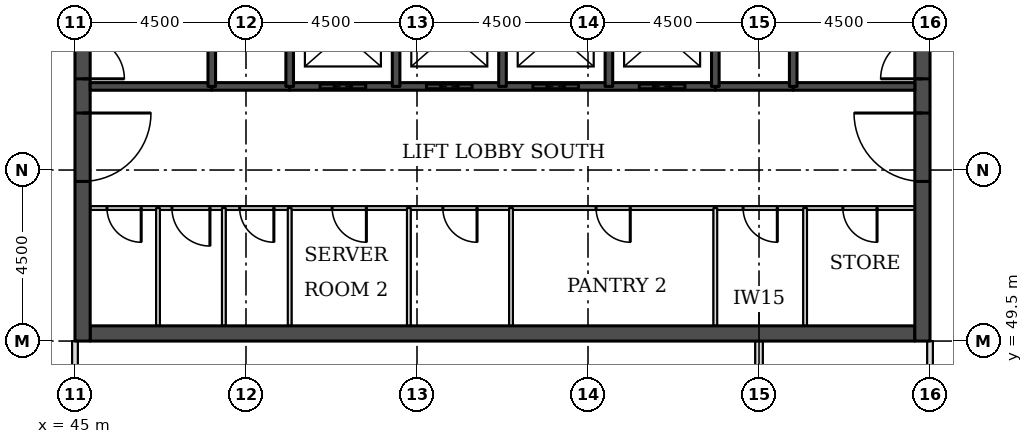
"""IFC4 building model, lengths in metres.
Left out: names, types, materials, properties, quantities, classifications, styles, units other than length and angle.
Written with IfcOpenShell. Run it as: python <this file> out.ifc"""

import sys

from ifc_helpers import new_model, si_unit, direction, frame, frame_2d, origin, place, context, subcontext, project, spatial, rectangle, extrude, element, fill, save


model = new_model("IFC4")
c1 = context("Model", 3, precision=1e-05, world=origin(), true_north=direction((0.0, 1.0)))
c2 = subcontext(c1, "Body", "Model", "MODEL_VIEW")
j1 = project(units=[si_unit("LENGTHUNIT", "METRE"), si_unit("PLANEANGLEUNIT", "RADIAN")], contexts=[c1])
p1 = place(None, origin())
s1 = spatial("IfcSite", under=j1, at=p1, CompositionType="ELEMENT")
p2 = place(p1, origin())
s2 = spatial("IfcBuilding", under=s1, at=p2, CompositionType="ELEMENT")
p3 = place(p2, frame((0.0, 0.0, 188.4)))
s3 = spatial("IfcBuildingStorey", under=s2, at=p3, CompositionType="ELEMENT", Elevation=188.4)
p4 = place(p3, frame((45.4, 49.7, 0.0), z_axis=(0.0, 0.0, 1.0), x_axis=(1.0, 0.0, 0.0)))
e1 = element("IfcWall", 1, at=p4, inside=s3, PredefinedType="SHEAR", context=c2, shape_type="SweptSolid", body=[
    extrude(rectangle(XDim=21.7, YDim=0.4, at=frame_2d((10.85, 0.0))), origin(), (0.0, 0.0, 1.0), 3.7),
])
p5 = place(p3, frame((45.2, 49.5, 0.0), z_axis=(0.0, 0.0, 1.0), x_axis=(0.0, 1.0, 0.0)))
e2 = element("IfcWall", 2, at=p5, inside=s3, PredefinedType="SHEAR", context=c2, shape_type="SweptSolid", body=[
    extrude(rectangle(XDim=22.5, YDim=0.4, at=frame_2d((11.25, 0.0))), origin(), (0.0, 0.0, 1.0), 3.7),
])
p6 = place(p5, frame((4.2, 0.0, 0.0)))
e3 = element("IfcOpeningElement", 3, at=p6, cuts=e2, PredefinedType="OPENING", context=c2, shape_type="SweptSolid", body=[
    extrude(rectangle(XDim=1.8, YDim=2.1, at=frame_2d((0.9, 1.05))), frame((0.0, 0.21, 0.0), z_axis=(0.0, -1.0, 0.0), x_axis=(1.0, 0.0, 0.0)), (0.0, 0.0, 1.0), 0.42),
])
p7 = place(p5, frame((6.9, 0.0, 0.0)))
e4 = element("IfcOpeningElement", 4, at=p7, cuts=e2, PredefinedType="OPENING", context=c2, shape_type="SweptSolid", body=[
    extrude(rectangle(XDim=1.1, YDim=2.1, at=frame_2d((0.55, 1.05))), frame((0.0, 0.21, 0.0), z_axis=(0.0, -1.0, 0.0), x_axis=(1.0, 0.0, 0.0)), (0.0, 0.0, 1.0), 0.42),
])
p8 = place(p5, frame((13.6, 0.0, 0.0)))
e5 = element("IfcOpeningElement", 5, at=p8, cuts=e2, PredefinedType="OPENING", context=c2, shape_type="SweptSolid", body=[
    extrude(rectangle(XDim=1.1, YDim=2.1, at=frame_2d((0.55, 1.05))), frame((0.0, 0.21, 0.0), z_axis=(0.0, -1.0, 0.0), x_axis=(1.0, 0.0, 0.0)), (0.0, 0.0, 1.0), 0.42),
])
p9 = place(p5, frame((16.5, 0.0, 0.0)))
e6 = element("IfcOpeningElement", 6, at=p9, cuts=e2, PredefinedType="OPENING", context=c2, shape_type="SweptSolid", body=[
    extrude(rectangle(XDim=1.8, YDim=2.1, at=frame_2d((0.9, 1.05))), frame((0.0, 0.21, 0.0), z_axis=(0.0, -1.0, 0.0), x_axis=(1.0, 0.0, 0.0)), (0.0, 0.0, 1.0), 0.42),
])
p10 = place(p3, frame((67.3, 49.5, 0.0), z_axis=(0.0, 0.0, 1.0), x_axis=(0.0, 1.0, 0.0)))
e7 = element("IfcWall", 7, at=p10, inside=s3, PredefinedType="SHEAR", context=c2, shape_type="SweptSolid", body=[
    extrude(rectangle(XDim=22.5, YDim=0.4, at=frame_2d((11.25, 0.0))), origin(), (0.0, 0.0, 1.0), 3.7),
])
p11 = place(p10, frame((4.2, 0.0, 0.0)))
e8 = element("IfcOpeningElement", 8, at=p11, cuts=e7, PredefinedType="OPENING", context=c2, shape_type="SweptSolid", body=[
    extrude(rectangle(XDim=1.8, YDim=2.1, at=frame_2d((0.9, 1.05))), frame((0.0, 0.21, 0.0), z_axis=(0.0, -1.0, 0.0), x_axis=(1.0, 0.0, 0.0)), (0.0, 0.0, 1.0), 0.42),
])
p12 = place(p10, frame((6.9, 0.0, 0.0)))
e9 = element("IfcOpeningElement", 9, at=p12, cuts=e7, PredefinedType="OPENING", context=c2, shape_type="SweptSolid", body=[
    extrude(rectangle(XDim=1.1, YDim=2.1, at=frame_2d((0.55, 1.05))), frame((0.0, 0.21, 0.0), z_axis=(0.0, -1.0, 0.0), x_axis=(1.0, 0.0, 0.0)), (0.0, 0.0, 1.0), 0.42),
])
p13 = place(p10, frame((13.6, 0.0, 0.0)))
e10 = element("IfcOpeningElement", 10, at=p13, cuts=e7, PredefinedType="OPENING", context=c2, shape_type="SweptSolid", body=[
    extrude(rectangle(XDim=1.1, YDim=2.1, at=frame_2d((0.55, 1.05))), frame((0.0, 0.21, 0.0), z_axis=(0.0, -1.0, 0.0), x_axis=(1.0, 0.0, 0.0)), (0.0, 0.0, 1.0), 0.42),
])
p14 = place(p10, frame((16.5, 0.0, 0.0)))
e11 = element("IfcOpeningElement", 11, at=p14, cuts=e7, PredefinedType="OPENING", context=c2, shape_type="SweptSolid", body=[
    extrude(rectangle(XDim=1.8, YDim=2.1, at=frame_2d((0.9, 1.05))), frame((0.0, 0.21, 0.0), z_axis=(0.0, -1.0, 0.0), x_axis=(1.0, 0.0, 0.0)), (0.0, 0.0, 1.0), 0.42),
])
p15 = place(p3, frame((67.5, 45.0, 0.0), z_axis=(0.0, 0.0, 1.0), x_axis=(0.0, 1.0, 0.0)))
e12 = element("IfcWall", 12, at=p15, inside=s3, PredefinedType="PARTITIONING", context=c2, shape_type="SweptSolid", body=[
    extrude(rectangle(XDim=4.5, YDim=0.15, at=frame_2d((2.25, 0.0))), origin(), (0.0, 0.0, 1.0), 3.022),
])
p16 = place(p3, frame((63.0, 46.5, 0.0), z_axis=(0.0, 0.0, 1.0), x_axis=(0.0, 1.0, 0.0)))
e13 = element("IfcWall", 13, at=p16, inside=s3, PredefinedType="PARTITIONING", context=c2, shape_type="SweptSolid", body=[
    extrude(rectangle(XDim=3.0, YDim=0.2, at=frame_2d((1.5, 0.0))), origin(), (0.0, 0.0, 1.0), 3.55),
])
p17 = place(p3, frame((45.0, 48.0, 0.0), z_axis=(0.0, 0.0, 1.0), x_axis=(0.0, 1.0, 0.0)))
e14 = element("IfcWall", 14, at=p17, inside=s3, PredefinedType="PARTITIONING", context=c2, shape_type="SweptSolid", body=[
    extrude(rectangle(XDim=1.5, YDim=0.15, at=frame_2d((0.75, 0.0))), origin(), (0.0, 0.0, 1.0), 3.022),
])
p18 = place(p3, frame((45.4, 53.0, 0.0), z_axis=(0.0, 0.0, 1.0), x_axis=(1.0, 0.0, 0.0)))
e15 = element("IfcWall", 15, at=p18, inside=s3, PredefinedType="PARTITIONING", context=c2, shape_type="SweptSolid", body=[
    extrude(rectangle(XDim=21.7, YDim=0.1, at=frame_2d((10.85, 0.0))), origin(), (0.0, 0.0, 1.0), 3.55),
])
p19 = place(p18, frame((19.806, 0.0, 0.0)))
e16 = element("IfcOpeningElement", 16, at=p19, cuts=e15, PredefinedType="OPENING", context=c2, shape_type="SweptSolid", body=[
    extrude(rectangle(XDim=0.9, YDim=2.1, at=frame_2d((0.45, 1.05))), frame((0.0, 0.06, 0.0), z_axis=(0.0, -1.0, 0.0), x_axis=(1.0, 0.0, 0.0)), (0.0, 0.0, 1.0), 0.12),
])
p20 = place(p18, frame((17.181, 0.0, 0.0)))
e17 = element("IfcOpeningElement", 17, at=p20, cuts=e15, PredefinedType="OPENING", context=c2, shape_type="SweptSolid", body=[
    extrude(rectangle(XDim=0.9, YDim=2.1, at=frame_2d((0.45, 1.05))), frame((0.0, 0.06, 0.0), z_axis=(0.0, -1.0, 0.0), x_axis=(1.0, 0.0, 0.0)), (0.0, 0.0, 1.0), 0.12),
])
p21 = place(p18, frame((0.442, 0.0, 0.0)))
e18 = element("IfcOpeningElement", 18, at=p21, cuts=e15, PredefinedType="OPENING", context=c2, shape_type="SweptSolid", body=[
    extrude(rectangle(XDim=0.9, YDim=2.1, at=frame_2d((0.45, 1.05))), frame((0.0, 0.06, 0.0), z_axis=(0.0, -1.0, 0.0), x_axis=(1.0, 0.0, 0.0)), (0.0, 0.0, 1.0), 0.12),
])
p22 = place(p18, frame((2.151, 0.0, 0.0)))
e19 = element("IfcOpeningElement", 19, at=p22, cuts=e15, PredefinedType="OPENING", context=c2, shape_type="SweptSolid", body=[
    extrude(rectangle(XDim=1.0, YDim=2.1, at=frame_2d((0.5, 1.05))), frame((0.0, 0.06, 0.0), z_axis=(0.0, -1.0, 0.0), x_axis=(1.0, 0.0, 0.0)), (0.0, 0.0, 1.0), 0.12),
])
p23 = place(p18, frame((3.934, 0.0, 0.0)))
e20 = element("IfcOpeningElement", 20, at=p23, cuts=e15, PredefinedType="OPENING", context=c2, shape_type="SweptSolid", body=[
    extrude(rectangle(XDim=0.9, YDim=2.1, at=frame_2d((0.45, 1.05))), frame((0.0, 0.06, 0.0), z_axis=(0.0, -1.0, 0.0), x_axis=(1.0, 0.0, 0.0)), (0.0, 0.0, 1.0), 0.12),
])
p24 = place(p18, frame((6.368, 0.0, 0.0)))
e21 = element("IfcOpeningElement", 21, at=p24, cuts=e15, PredefinedType="OPENING", context=c2, shape_type="SweptSolid", body=[
    extrude(rectangle(XDim=0.9, YDim=2.1, at=frame_2d((0.45, 1.05))), frame((0.0, 0.06, 0.0), z_axis=(0.0, -1.0, 0.0), x_axis=(1.0, 0.0, 0.0)), (0.0, 0.0, 1.0), 0.12),
])
p25 = place(p18, frame((9.28, 0.0, 0.0)))
e22 = element("IfcOpeningElement", 22, at=p25, cuts=e15, PredefinedType="OPENING", context=c2, shape_type="SweptSolid", body=[
    extrude(rectangle(XDim=0.9, YDim=2.1, at=frame_2d((0.45, 1.05))), frame((0.0, 0.06, 0.0), z_axis=(0.0, -1.0, 0.0), x_axis=(1.0, 0.0, 0.0)), (0.0, 0.0, 1.0), 0.12),
])
p26 = place(p18, frame((13.312, 0.0, 0.0)))
e23 = element("IfcOpeningElement", 23, at=p26, cuts=e15, PredefinedType="OPENING", context=c2, shape_type="SweptSolid", body=[
    extrude(rectangle(XDim=0.9, YDim=2.1, at=frame_2d((0.45, 1.05))), frame((0.0, 0.06, 0.0), z_axis=(0.0, -1.0, 0.0), x_axis=(1.0, 0.0, 0.0)), (0.0, 0.0, 1.0), 0.12),
])
for number, where, z_axis, x_axis in (
    (24, (48.6, 56.2, 0.0), (0.0, 0.0, 1.0), (1.0, 0.0, 0.0)),
    (25, (61.85, 56.2, 0.0), (0.0, 0.0, 1.0), (1.0, 0.0, 0.0)),
):
    element("IfcWall", number, at=place(p3, frame(where, z_axis=z_axis, x_axis=x_axis)), inside=s3, PredefinedType="SOLIDWALL", context=c2, shape_type="SweptSolid", body=[
        extrude(rectangle(XDim=2.05, YDim=0.2, at=frame_2d((1.025, 0.0))), origin(), (0.0, 0.0, 1.0), 3.55),
    ])
p27 = place(p3, frame((45.4, 56.2, 0.0), z_axis=(0.0, 0.0, 1.0), x_axis=(1.0, 0.0, 0.0)))
e26 = element("IfcWall", 26, at=p27, inside=s3, PredefinedType="SOLIDWALL", context=c2, shape_type="SweptSolid", body=[
    extrude(rectangle(XDim=3.2, YDim=0.2, at=frame_2d((1.6, 0.0))), origin(), (0.0, 0.0, 1.0), 3.55),
])
p28 = place(p3, frame((50.65, 56.2, 0.0), z_axis=(0.0, 0.0, 1.0), x_axis=(1.0, 0.0, 0.0)))
e27 = element("IfcWall", 27, at=p28, inside=s3, PredefinedType="SOLIDWALL", context=c2, shape_type="SweptSolid", body=[
    extrude(rectangle(XDim=11.2, YDim=0.2, at=frame_2d((5.6, 0.0))), origin(), (0.0, 0.0, 1.0), 3.55),
])
p29 = place(p28, frame((0.8, 0.0, 0.0)))
e28 = element("IfcOpeningElement", 28, at=p29, cuts=e27, PredefinedType="OPENING", context=c2, shape_type="SweptSolid", body=[
    extrude(rectangle(XDim=1.2, YDim=2.1, at=frame_2d((0.6, 1.05))), frame((0.0, 0.11, 0.0), z_axis=(0.0, -1.0, 0.0), x_axis=(1.0, 0.0, 0.0)), (0.0, 0.0, 1.0), 0.22),
])
p30 = place(p28, frame((3.6, 0.0, 0.0)))
e29 = element("IfcOpeningElement", 29, at=p30, cuts=e27, PredefinedType="OPENING", context=c2, shape_type="SweptSolid", body=[
    extrude(rectangle(XDim=1.2, YDim=2.1, at=frame_2d((0.6, 1.05))), frame((0.0, 0.11, 0.0), z_axis=(0.0, -1.0, 0.0), x_axis=(1.0, 0.0, 0.0)), (0.0, 0.0, 1.0), 0.22),
])
p31 = place(p28, frame((6.4, 0.0, 0.0)))
e30 = element("IfcOpeningElement", 30, at=p31, cuts=e27, PredefinedType="OPENING", context=c2, shape_type="SweptSolid", body=[
    extrude(rectangle(XDim=1.2, YDim=2.1, at=frame_2d((0.6, 1.05))), frame((0.0, 0.11, 0.0), z_axis=(0.0, -1.0, 0.0), x_axis=(1.0, 0.0, 0.0)), (0.0, 0.0, 1.0), 0.22),
])
p32 = place(p28, frame((9.2, 0.0, 0.0)))
e31 = element("IfcOpeningElement", 31, at=p32, cuts=e27, PredefinedType="OPENING", context=c2, shape_type="SweptSolid", body=[
    extrude(rectangle(XDim=1.2, YDim=2.1, at=frame_2d((0.6, 1.05))), frame((0.0, 0.11, 0.0), z_axis=(0.0, -1.0, 0.0), x_axis=(1.0, 0.0, 0.0)), (0.0, 0.0, 1.0), 0.22),
])
p33 = place(p3, frame((63.9, 56.2, 0.0), z_axis=(0.0, 0.0, 1.0), x_axis=(1.0, 0.0, 0.0)))
e32 = element("IfcWall", 32, at=p33, inside=s3, PredefinedType="SOLIDWALL", context=c2, shape_type="SweptSolid", body=[
    extrude(rectangle(XDim=3.2, YDim=0.2, at=frame_2d((1.6, 0.0))), origin(), (0.0, 0.0, 1.0), 3.55),
])
p34 = place(p3, frame((47.185, 49.9, 0.0), z_axis=(0.0, 0.0, 1.0), x_axis=(0.0, 1.0, 0.0)))
e33 = element("IfcWall", 33, at=p34, inside=s3, PredefinedType="PARTITIONING", context=c2, shape_type="SweptSolid", body=[
    extrude(rectangle(XDim=3.1, YDim=0.1, at=frame_2d((1.55, 0.0))), origin(), (0.0, 0.0, 1.0), 3.55),
])
p35 = place(p3, frame((48.6, 56.2, 0.0), z_axis=(0.0, 0.0, 1.0), x_axis=(0.0, 1.0, 0.0)))
e34 = element("IfcWall", 34, at=p35, inside=s3, PredefinedType="SOLIDWALL", context=c2, shape_type="SweptSolid", body=[
    extrude(rectangle(XDim=5.8, YDim=0.2, at=frame_2d((2.9, 0.0))), origin(), (0.0, 0.0, 1.0), 3.55),
])
for number, where, z_axis, x_axis in (
    (35, (48.917, 49.9, 0.0), (0.0, 0.0, 1.0), (0.0, 1.0, 0.0)),
    (36, (50.65, 49.9, 0.0), (0.0, 0.0, 1.0), (0.0, 1.0, 0.0)),
):
    element("IfcWall", number, at=place(p3, frame(where, z_axis=z_axis, x_axis=x_axis)), inside=s3, PredefinedType="PARTITIONING", context=c2, shape_type="SweptSolid", body=[
        extrude(rectangle(XDim=3.1, YDim=0.1, at=frame_2d((1.55, 0.0))), origin(), (0.0, 0.0, 1.0), 3.55),
    ])
for number, where, z_axis, x_axis in (
    (37, (50.65, 56.2, 0.0), (0.0, 0.0, 1.0), (0.0, 1.0, 0.0)),
    (38, (53.45, 56.2, 0.0), (0.0, 0.0, 1.0), (0.0, 1.0, 0.0)),
):
    element("IfcWall", number, at=place(p3, frame(where, z_axis=z_axis, x_axis=x_axis)), inside=s3, PredefinedType="SOLIDWALL", context=c2, shape_type="SweptSolid", body=[
        extrude(rectangle(XDim=2.8, YDim=0.2, at=frame_2d((1.4, 0.0))), origin(), (0.0, 0.0, 1.0), 3.55),
    ])
p36 = place(p3, frame((53.786, 49.9, 0.0), z_axis=(0.0, 0.0, 1.0), x_axis=(0.0, 1.0, 0.0)))
e39 = element("IfcWall", 39, at=p36, inside=s3, PredefinedType="PARTITIONING", context=c2, shape_type="SweptSolid", body=[
    extrude(rectangle(XDim=3.1, YDim=0.1, at=frame_2d((1.55, 0.0))), origin(), (0.0, 0.0, 1.0), 3.55),
])
p37 = place(p3, frame((56.25, 56.2, 0.0), z_axis=(0.0, 0.0, 1.0), x_axis=(0.0, 1.0, 0.0)))
e40 = element("IfcWall", 40, at=p37, inside=s3, PredefinedType="SOLIDWALL", context=c2, shape_type="SweptSolid", body=[
    extrude(rectangle(XDim=2.8, YDim=0.2, at=frame_2d((1.4, 0.0))), origin(), (0.0, 0.0, 1.0), 3.55),
])
p38 = place(p3, frame((56.474, 49.9, 0.0), z_axis=(0.0, 0.0, 1.0), x_axis=(0.0, 1.0, 0.0)))
e41 = element("IfcWall", 41, at=p38, inside=s3, PredefinedType="PARTITIONING", context=c2, shape_type="SweptSolid", body=[
    extrude(rectangle(XDim=3.1, YDim=0.1, at=frame_2d((1.55, 0.0))), origin(), (0.0, 0.0, 1.0), 3.55),
])
p39 = place(p3, frame((59.05, 56.2, 0.0), z_axis=(0.0, 0.0, 1.0), x_axis=(0.0, 1.0, 0.0)))
e42 = element("IfcWall", 42, at=p39, inside=s3, PredefinedType="SOLIDWALL", context=c2, shape_type="SweptSolid", body=[
    extrude(rectangle(XDim=2.8, YDim=0.2, at=frame_2d((1.4, 0.0))), origin(), (0.0, 0.0, 1.0), 3.55),
])
p40 = place(p3, frame((61.85, 49.9, 0.0), z_axis=(0.0, 0.0, 1.0), x_axis=(0.0, 1.0, 0.0)))
e43 = element("IfcWall", 43, at=p40, inside=s3, PredefinedType="PARTITIONING", context=c2, shape_type="SweptSolid", body=[
    extrude(rectangle(XDim=3.1, YDim=0.1, at=frame_2d((1.55, 0.0))), origin(), (0.0, 0.0, 1.0), 3.55),
])
p41 = place(p3, frame((61.85, 56.2, 0.0), z_axis=(0.0, 0.0, 1.0), x_axis=(0.0, 1.0, 0.0)))
e44 = element("IfcWall", 44, at=p41, inside=s3, PredefinedType="SOLIDWALL", context=c2, shape_type="SweptSolid", body=[
    extrude(rectangle(XDim=2.8, YDim=0.2, at=frame_2d((1.4, 0.0))), origin(), (0.0, 0.0, 1.0), 3.55),
])
p42 = place(p3, frame((63.9, 56.2, 0.0), z_axis=(0.0, 0.0, 1.0), x_axis=(0.0, 1.0, 0.0)))
e45 = element("IfcWall", 45, at=p42, inside=s3, PredefinedType="SOLIDWALL", context=c2, shape_type="SweptSolid", body=[
    extrude(rectangle(XDim=5.8, YDim=0.2, at=frame_2d((2.9, 0.0))), origin(), (0.0, 0.0, 1.0), 3.55),
])
p43 = place(p3, frame((64.212, 49.9, 0.0), z_axis=(0.0, 0.0, 1.0), x_axis=(0.0, 1.0, 0.0)))
e46 = element("IfcWall", 46, at=p43, inside=s3, PredefinedType="PARTITIONING", context=c2, shape_type="SweptSolid", body=[
    extrude(rectangle(XDim=3.1, YDim=0.1, at=frame_2d((1.55, 0.0))), origin(), (0.0, 0.0, 1.0), 3.55),
])
p44 = place(p29, origin())
e47 = element("IfcDoor", 47, at=p44, inside=s3, OperationType="DOUBLE_DOOR_SLIDING", PredefinedType="DOOR", context=c2, shape_type="SweptSolid", body=[
    extrude(rectangle(XDim=1.2, YDim=2.1, at=frame_2d((0.6, 1.05))), frame((0.0, 0.025, 0.0), z_axis=(0.0, -1.0, 0.0), x_axis=(1.0, 0.0, 0.0)), (0.0, 0.0, 1.0), 0.05),
])
fill(e28, e47)
p45 = place(p30, origin())
e48 = element("IfcDoor", 48, at=p45, inside=s3, OperationType="DOUBLE_DOOR_SLIDING", PredefinedType="DOOR", context=c2, shape_type="SweptSolid", body=[
    extrude(rectangle(XDim=1.2, YDim=2.1, at=frame_2d((0.6, 1.05))), frame((0.0, 0.025, 0.0), z_axis=(0.0, -1.0, 0.0), x_axis=(1.0, 0.0, 0.0)), (0.0, 0.0, 1.0), 0.05),
])
fill(e29, e48)
p46 = place(p31, origin())
e49 = element("IfcDoor", 49, at=p46, inside=s3, OperationType="DOUBLE_DOOR_SLIDING", PredefinedType="DOOR", context=c2, shape_type="SweptSolid", body=[
    extrude(rectangle(XDim=1.2, YDim=2.1, at=frame_2d((0.6, 1.05))), frame((0.0, 0.025, 0.0), z_axis=(0.0, -1.0, 0.0), x_axis=(1.0, 0.0, 0.0)), (0.0, 0.0, 1.0), 0.05),
])
fill(e30, e49)
p47 = place(p32, origin())
e50 = element("IfcDoor", 50, at=p47, inside=s3, OperationType="DOUBLE_DOOR_SLIDING", PredefinedType="DOOR", context=c2, shape_type="SweptSolid", body=[
    extrude(rectangle(XDim=1.2, YDim=2.1, at=frame_2d((0.6, 1.05))), frame((0.0, 0.025, 0.0), z_axis=(0.0, -1.0, 0.0), x_axis=(1.0, 0.0, 0.0)), (0.0, 0.0, 1.0), 0.05),
])
fill(e31, e50)
p48 = place(p6, frame((1.8, 0.0, 0.0), z_axis=(0.0, 0.0, 1.0), x_axis=(-1.0, 0.0, 0.0)))
e51 = element("IfcDoor", 51, at=p48, inside=s3, OperationType="SINGLE_SWING_LEFT", PredefinedType="DOOR", context=c2, shape_type="SweptSolid", body=[
    extrude(rectangle(XDim=1.8, YDim=2.1, at=frame_2d((0.9, 1.05))), frame((0.0, 0.025, 0.0), z_axis=(0.0, -1.0, 0.0), x_axis=(1.0, 0.0, 0.0)), (0.0, 0.0, 1.0), 0.05),
])
fill(e3, e51)
p49 = place(p7, frame((1.1, 0.0, 0.0), z_axis=(0.0, 0.0, 1.0), x_axis=(-1.0, 0.0, 0.0)))
e52 = element("IfcDoor", 52, at=p49, inside=s3, OperationType="SINGLE_SWING_RIGHT", PredefinedType="DOOR", context=c2, shape_type="SweptSolid", body=[
    extrude(rectangle(XDim=1.1, YDim=2.1, at=frame_2d((0.55, 1.05))), frame((0.0, 0.025, 0.0), z_axis=(0.0, -1.0, 0.0), x_axis=(1.0, 0.0, 0.0)), (0.0, 0.0, 1.0), 0.05),
])
fill(e4, e52)
p50 = place(p11, origin())
e53 = element("IfcDoor", 53, at=p50, inside=s3, OperationType="SINGLE_SWING_RIGHT", PredefinedType="DOOR", context=c2, shape_type="SweptSolid", body=[
    extrude(rectangle(XDim=1.8, YDim=2.1, at=frame_2d((0.9, 1.05))), frame((0.0, 0.025, 0.0), z_axis=(0.0, -1.0, 0.0), x_axis=(1.0, 0.0, 0.0)), (0.0, 0.0, 1.0), 0.05),
])
fill(e8, e53)
p51 = place(p12, origin())
e54 = element("IfcDoor", 54, at=p51, inside=s3, OperationType="SINGLE_SWING_LEFT", PredefinedType="DOOR", context=c2, shape_type="SweptSolid", body=[
    extrude(rectangle(XDim=1.1, YDim=2.1, at=frame_2d((0.55, 1.05))), frame((0.0, 0.025, 0.0), z_axis=(0.0, -1.0, 0.0), x_axis=(1.0, 0.0, 0.0)), (0.0, 0.0, 1.0), 0.05),
])
fill(e9, e54)
p52 = place(p19, frame((0.9, 0.0, 0.0), z_axis=(0.0, 0.0, 1.0), x_axis=(-1.0, 0.0, 0.0)))
e55 = element("IfcDoor", 55, at=p52, inside=s3, OperationType="SINGLE_SWING_LEFT", PredefinedType="DOOR", context=c2, shape_type="SweptSolid", body=[
    extrude(rectangle(XDim=0.9, YDim=2.1, at=frame_2d((0.45, 1.05))), frame((0.0, 0.025, 0.0), z_axis=(0.0, -1.0, 0.0), x_axis=(1.0, 0.0, 0.0)), (0.0, 0.0, 1.0), 0.05),
])
fill(e16, e55)
p53 = place(p20, frame((0.9, 0.0, 0.0), z_axis=(0.0, 0.0, 1.0), x_axis=(-1.0, 0.0, 0.0)))
e56 = element("IfcDoor", 56, at=p53, inside=s3, OperationType="SINGLE_SWING_LEFT", PredefinedType="DOOR", context=c2, shape_type="SweptSolid", body=[
    extrude(rectangle(XDim=0.9, YDim=2.1, at=frame_2d((0.45, 1.05))), frame((0.0, 0.025, 0.0), z_axis=(0.0, -1.0, 0.0), x_axis=(1.0, 0.0, 0.0)), (0.0, 0.0, 1.0), 0.05),
])
fill(e17, e56)
p54 = place(p21, frame((0.9, 0.0, 0.0), z_axis=(0.0, 0.0, 1.0), x_axis=(-1.0, 0.0, 0.0)))
e57 = element("IfcDoor", 57, at=p54, inside=s3, OperationType="SINGLE_SWING_LEFT", PredefinedType="DOOR", context=c2, shape_type="SweptSolid", body=[
    extrude(rectangle(XDim=0.9, YDim=2.1, at=frame_2d((0.45, 1.05))), frame((0.0, 0.025, 0.0), z_axis=(0.0, -1.0, 0.0), x_axis=(1.0, 0.0, 0.0)), (0.0, 0.0, 1.0), 0.05),
])
fill(e18, e57)
p55 = place(p22, frame((1.0, 0.0, 0.0), z_axis=(0.0, 0.0, 1.0), x_axis=(-1.0, 0.0, 0.0)))
e58 = element("IfcDoor", 58, at=p55, inside=s3, OperationType="SINGLE_SWING_LEFT", PredefinedType="DOOR", context=c2, shape_type="SweptSolid", body=[
    extrude(rectangle(XDim=1.0, YDim=2.1, at=frame_2d((0.5, 1.05))), frame((0.0, 0.025, 0.0), z_axis=(0.0, -1.0, 0.0), x_axis=(1.0, 0.0, 0.0)), (0.0, 0.0, 1.0), 0.05),
])
fill(e19, e58)
p56 = place(p23, frame((0.9, 0.0, 0.0), z_axis=(0.0, 0.0, 1.0), x_axis=(-1.0, 0.0, 0.0)))
e59 = element("IfcDoor", 59, at=p56, inside=s3, OperationType="SINGLE_SWING_LEFT", PredefinedType="DOOR", context=c2, shape_type="SweptSolid", body=[
    extrude(rectangle(XDim=0.9, YDim=2.1, at=frame_2d((0.45, 1.05))), frame((0.0, 0.025, 0.0), z_axis=(0.0, -1.0, 0.0), x_axis=(1.0, 0.0, 0.0)), (0.0, 0.0, 1.0), 0.05),
])
fill(e20, e59)
p57 = place(p24, frame((0.9, 0.0, 0.0), z_axis=(0.0, 0.0, 1.0), x_axis=(-1.0, 0.0, 0.0)))
e60 = element("IfcDoor", 60, at=p57, inside=s3, OperationType="SINGLE_SWING_LEFT", PredefinedType="DOOR", context=c2, shape_type="SweptSolid", body=[
    extrude(rectangle(XDim=0.9, YDim=2.1, at=frame_2d((0.45, 1.05))), frame((0.0, 0.025, 0.0), z_axis=(0.0, -1.0, 0.0), x_axis=(1.0, 0.0, 0.0)), (0.0, 0.0, 1.0), 0.05),
])
fill(e21, e60)
p58 = place(p25, frame((0.9, 0.0, 0.0), z_axis=(0.0, 0.0, 1.0), x_axis=(-1.0, 0.0, 0.0)))
e61 = element("IfcDoor", 61, at=p58, inside=s3, OperationType="SINGLE_SWING_LEFT", PredefinedType="DOOR", context=c2, shape_type="SweptSolid", body=[
    extrude(rectangle(XDim=0.9, YDim=2.1, at=frame_2d((0.45, 1.05))), frame((0.0, 0.025, 0.0), z_axis=(0.0, -1.0, 0.0), x_axis=(1.0, 0.0, 0.0)), (0.0, 0.0, 1.0), 0.05),
])
fill(e22, e61)
p59 = place(p26, frame((0.9, 0.0, 0.0), z_axis=(0.0, 0.0, 1.0), x_axis=(-1.0, 0.0, 0.0)))
e62 = element("IfcDoor", 62, at=p59, inside=s3, OperationType="SINGLE_SWING_LEFT", PredefinedType="DOOR", context=c2, shape_type="SweptSolid", body=[
    extrude(rectangle(XDim=0.9, YDim=2.1, at=frame_2d((0.45, 1.05))), frame((0.0, 0.025, 0.0), z_axis=(0.0, -1.0, 0.0), x_axis=(1.0, 0.0, 0.0)), (0.0, 0.0, 1.0), 0.05),
])
fill(e23, e62)
save(model, sys.argv[1])
